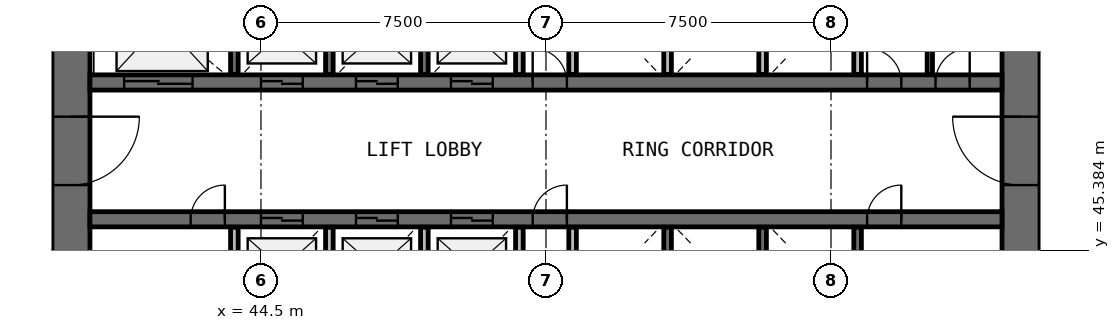
"""IFC4 building model, lengths in metres.
Left out: names, types, materials, properties, quantities, classifications, styles, units other than length and angle.
Written with IfcOpenShell. Run it as: python <this file> out.ifc"""

import sys

from ifc_helpers import new_model, si_unit, direction, frame, frame_2d, origin, place, context, subcontext, project, spatial, rectangle, extrude, source, transform, mapped, element, fill, save


model = new_model("IFC4")
c1 = context("Model", 3, precision=1e-05, world=origin(), true_north=direction((0.0, 1.0)))
c2 = subcontext(c1, "Body", "Model", "MODEL_VIEW")
j1 = project(units=[si_unit("LENGTHUNIT", "METRE"), si_unit("PLANEANGLEUNIT", "RADIAN")], contexts=[c1])
p1 = place(None, origin())
s1 = spatial("IfcSite", under=j1, at=p1, CompositionType="ELEMENT")
p2 = place(p1, origin())
s2 = spatial("IfcBuilding", under=s1, at=p2, CompositionType="ELEMENT")
p3 = place(p2, frame((0.0, 0.0, 9.4)))
s3 = spatial("IfcBuildingStorey", under=s2, at=p3, CompositionType="ELEMENT", Elevation=9.4)
p4 = place(p3, frame((64.5, 38.0, 0.0), z_axis=(0.0, 0.0, 1.0), x_axis=(0.0, 1.0, 0.0)))
e1 = element("IfcWall", 1, at=p4, inside=s3, PredefinedType="SHEAR", context=c2, shape_type="SweptSolid", body=[
    extrude(rectangle(XDim=20.0, YDim=1.0, at=frame_2d((10.0, 0.0))), origin(), (0.0, 0.0, 1.0), 4.4),
])
p5 = place(p4, frame((9.1, 0.0, 0.0)))
e2 = element("IfcOpeningElement", 2, at=p5, cuts=e1, PredefinedType="OPENING", context=c2, shape_type="SweptSolid", body=[
    extrude(rectangle(XDim=1.8, YDim=2.1, at=frame_2d((0.9, 1.05))), frame((0.0, 0.51, 0.0), z_axis=(0.0, -1.0, 0.0), x_axis=(1.0, 0.0, 0.0)), (0.0, 0.0, 1.0), 1.02),
])
p6 = place(p3, frame((39.5, 58.0, 0.0), z_axis=(0.0, 0.0, 1.0), x_axis=(0.0, -1.0, 0.0)))
e3 = element("IfcWall", 3, at=p6, inside=s3, PredefinedType="SHEAR", context=c2, shape_type="SweptSolid", body=[
    extrude(rectangle(XDim=20.0, YDim=1.0, at=frame_2d((10.0, 0.0))), origin(), (0.0, 0.0, 1.0), 4.4),
])
p7 = place(p6, frame((9.1, 0.0, 0.0)))
e4 = element("IfcOpeningElement", 4, at=p7, cuts=e3, PredefinedType="OPENING", context=c2, shape_type="SweptSolid", body=[
    extrude(rectangle(XDim=1.8, YDim=2.1, at=frame_2d((0.9, 1.05))), frame((0.0, 0.51, 0.0), z_axis=(0.0, -1.0, 0.0), x_axis=(1.0, 0.0, 0.0)), (0.0, 0.0, 1.0), 1.02),
])
p8 = place(p3, frame((40.0, 49.8, 0.0), z_axis=(0.0, 0.0, 1.0), x_axis=(1.0, 0.0, 0.0)))
e5 = element("IfcWall", 5, at=p8, inside=s3, PredefinedType="SHEAR", context=c2, shape_type="SweptSolid", body=[
    extrude(rectangle(XDim=24.0, YDim=0.4, at=frame_2d((12.0, 0.0))), origin(), (0.0, 0.0, 1.0), 4.4),
])
p9 = place(p8, frame((4.5, 0.0, 0.0)))
e6 = element("IfcOpeningElement", 6, at=p9, cuts=e5, PredefinedType="OPENING", context=c2, shape_type="SweptSolid", body=[
    extrude(rectangle(XDim=1.1, YDim=2.1, at=frame_2d((0.55, 1.05))), frame((0.0, 0.21, 0.0), z_axis=(0.0, -1.0, 0.0), x_axis=(1.0, 0.0, 0.0)), (0.0, 0.0, 1.0), 0.42),
])
p10 = place(p8, frame((7.0, 0.0, 0.0)))
e7 = element("IfcOpeningElement", 7, at=p10, cuts=e5, PredefinedType="OPENING", context=c2, shape_type="SweptSolid", body=[
    extrude(rectangle(XDim=1.1, YDim=2.1, at=frame_2d((0.55, 1.05))), frame((0.0, 0.21, 0.0), z_axis=(0.0, -1.0, 0.0), x_axis=(1.0, 0.0, 0.0)), (0.0, 0.0, 1.0), 0.42),
])
p11 = place(p8, frame((9.5, 0.0, 0.0)))
e8 = element("IfcOpeningElement", 8, at=p11, cuts=e5, PredefinedType="OPENING", context=c2, shape_type="SweptSolid", body=[
    extrude(rectangle(XDim=1.1, YDim=2.1, at=frame_2d((0.55, 1.05))), frame((0.0, 0.21, 0.0), z_axis=(0.0, -1.0, 0.0), x_axis=(1.0, 0.0, 0.0)), (0.0, 0.0, 1.0), 0.42),
])
p12 = place(p8, frame((0.9, 0.0, 0.0)))
e9 = element("IfcOpeningElement", 9, at=p12, cuts=e5, PredefinedType="OPENING", context=c2, shape_type="SweptSolid", body=[
    extrude(rectangle(XDim=1.8, YDim=2.4, at=frame_2d((0.9, 1.2))), frame((0.0, 0.21, 0.0), z_axis=(0.0, -1.0, 0.0), x_axis=(1.0, 0.0, 0.0)), (0.0, 0.0, 1.0), 0.42),
])
p13 = place(p8, frame((20.45, 0.0, 0.0)))
e10 = element("IfcOpeningElement", 10, at=p13, cuts=e5, PredefinedType="OPENING", context=c2, shape_type="SweptSolid", body=[
    extrude(rectangle(XDim=0.9, YDim=2.1, at=frame_2d((0.45, 1.05))), frame((0.0, 0.21, 0.0), z_axis=(0.0, -1.0, 0.0), x_axis=(1.0, 0.0, 0.0)), (0.0, 0.0, 1.0), 0.42),
])
p14 = place(p8, frame((22.25, 0.0, 0.0)))
e11 = element("IfcOpeningElement", 11, at=p14, cuts=e5, PredefinedType="OPENING", context=c2, shape_type="SweptSolid", body=[
    extrude(rectangle(XDim=0.9, YDim=2.1, at=frame_2d((0.45, 1.05))), frame((0.0, 0.21, 0.0), z_axis=(0.0, -1.0, 0.0), x_axis=(1.0, 0.0, 0.0)), (0.0, 0.0, 1.0), 0.42),
])
p15 = place(p8, frame((11.65, 0.0, 0.0)))
e12 = element("IfcOpeningElement", 12, at=p15, cuts=e5, PredefinedType="OPENING", context=c2, shape_type="SweptSolid", body=[
    extrude(rectangle(XDim=0.9, YDim=2.1, at=frame_2d((0.45, 1.05))), frame((0.0, 0.21, 0.0), z_axis=(0.0, -1.0, 0.0), x_axis=(1.0, 0.0, 0.0)), (0.0, 0.0, 1.0), 0.42),
])
p16 = place(p3, frame((40.0, 46.2, 0.0), z_axis=(0.0, 0.0, 1.0), x_axis=(1.0, 0.0, 0.0)))
e13 = element("IfcWall", 13, at=p16, inside=s3, PredefinedType="SHEAR", context=c2, shape_type="SweptSolid", body=[
    extrude(rectangle(XDim=24.0, YDim=0.4, at=frame_2d((12.0, 0.0))), origin(), (0.0, 0.0, 1.0), 4.4),
])
p17 = place(p16, frame((4.5, 0.0, 0.0)))
e14 = element("IfcOpeningElement", 14, at=p17, cuts=e13, PredefinedType="OPENING", context=c2, shape_type="SweptSolid", body=[
    extrude(rectangle(XDim=1.1, YDim=2.1, at=frame_2d((0.55, 1.05))), frame((0.0, 0.21, 0.0), z_axis=(0.0, -1.0, 0.0), x_axis=(1.0, 0.0, 0.0)), (0.0, 0.0, 1.0), 0.42),
])
p18 = place(p16, frame((7.0, 0.0, 0.0)))
e15 = element("IfcOpeningElement", 15, at=p18, cuts=e13, PredefinedType="OPENING", context=c2, shape_type="SweptSolid", body=[
    extrude(rectangle(XDim=1.1, YDim=2.1, at=frame_2d((0.55, 1.05))), frame((0.0, 0.21, 0.0), z_axis=(0.0, -1.0, 0.0), x_axis=(1.0, 0.0, 0.0)), (0.0, 0.0, 1.0), 0.42),
])
p19 = place(p16, frame((9.5, 0.0, 0.0)))
e16 = element("IfcOpeningElement", 16, at=p19, cuts=e13, PredefinedType="OPENING", context=c2, shape_type="SweptSolid", body=[
    extrude(rectangle(XDim=1.1, YDim=2.1, at=frame_2d((0.55, 1.05))), frame((0.0, 0.21, 0.0), z_axis=(0.0, -1.0, 0.0), x_axis=(1.0, 0.0, 0.0)), (0.0, 0.0, 1.0), 0.42),
])
p20 = place(p16, frame((20.45, 0.0, 0.0)))
e17 = element("IfcOpeningElement", 17, at=p20, cuts=e13, PredefinedType="OPENING", context=c2, shape_type="SweptSolid", body=[
    extrude(rectangle(XDim=0.9, YDim=2.1, at=frame_2d((0.45, 1.05))), frame((0.0, 0.21, 0.0), z_axis=(0.0, -1.0, 0.0), x_axis=(1.0, 0.0, 0.0)), (0.0, 0.0, 1.0), 0.42),
])
p21 = place(p16, frame((2.65, 0.0, 0.0)))
e18 = element("IfcOpeningElement", 18, at=p21, cuts=e13, PredefinedType="OPENING", context=c2, shape_type="SweptSolid", body=[
    extrude(rectangle(XDim=0.9, YDim=2.1, at=frame_2d((0.45, 1.05))), frame((0.0, 0.21, 0.0), z_axis=(0.0, -1.0, 0.0), x_axis=(1.0, 0.0, 0.0)), (0.0, 0.0, 1.0), 0.42),
])
p22 = place(p16, frame((11.65, 0.0, 0.0)))
e19 = element("IfcOpeningElement", 19, at=p22, cuts=e13, PredefinedType="OPENING", context=c2, shape_type="SweptSolid", body=[
    extrude(rectangle(XDim=0.9, YDim=2.1, at=frame_2d((0.45, 1.05))), frame((0.0, 0.21, 0.0), z_axis=(0.0, -1.0, 0.0), x_axis=(1.0, 0.0, 0.0)), (0.0, 0.0, 1.0), 0.42),
])
for number, where, z_axis, x_axis in (
    (20, (43.8, 45.99, 0.0), (0.0, 0.0, 1.0), (0.0, -1.0, 0.0)),
    (21, (43.8, 52.37, 0.0), (0.0, 0.0, 1.0), (0.0, -1.0, 0.0)),
):
    element("IfcWall", number, at=place(p3, frame(where, z_axis=z_axis, x_axis=x_axis)), inside=s3, PredefinedType="SOLIDWALL", context=c2, shape_type="SweptSolid", body=[
        extrude(rectangle(XDim=2.36, YDim=0.2, at=frame_2d((1.18, 0.0))), origin(), (0.0, 0.0, 1.0), 3.95),
    ])
p23 = place(p3, frame((46.3, 43.6, 0.0), z_axis=(0.0, 0.0, 1.0), x_axis=(0.0, 1.0, 0.0)))
e22 = element("IfcWall", 22, at=p23, inside=s3, PredefinedType="SOLIDWALL", context=c2, shape_type="SweptSolid", body=[
    extrude(rectangle(XDim=2.39, YDim=0.2, at=frame_2d((1.195, 0.0))), origin(), (0.0, 0.0, 1.0), 3.95),
])
for number, where, z_axis, x_axis in (
    (23, (46.3, 50.01, 0.0), (0.0, 0.0, 1.0), (0.0, 1.0, 0.0)),
    (24, (48.8, 43.63, 0.0), (0.0, 0.0, 1.0), (0.0, 1.0, 0.0)),
    (25, (48.8, 50.01, 0.0), (0.0, 0.0, 1.0), (0.0, 1.0, 0.0)),
    (26, (51.3, 43.63, 0.0), (0.0, 0.0, 1.0), (0.0, 1.0, 0.0)),
):
    element("IfcWall", number, at=place(p3, frame(where, z_axis=z_axis, x_axis=x_axis)), inside=s3, PredefinedType="SOLIDWALL", context=c2, shape_type="SweptSolid", body=[
        extrude(rectangle(XDim=2.36, YDim=0.2, at=frame_2d((1.18, 0.0))), origin(), (0.0, 0.0, 1.0), 3.95),
    ])
for number, where, z_axis, x_axis in (
    (27, (51.3, 50.01, 0.0), (0.0, 0.0, 1.0), (0.0, 1.0, 0.0)),
    (28, (52.7, 45.99, 0.0), (0.0, 0.0, 1.0), (0.0, -1.0, 0.0)),
):
    element("IfcWall", number, at=place(p3, frame(where, z_axis=z_axis, x_axis=x_axis)), inside=s3, PredefinedType="SOLIDWALL", context=c2, shape_type="SweptSolid", body=[
        extrude(rectangle(XDim=2.39, YDim=0.2, at=frame_2d((1.195, 0.0))), origin(), (0.0, 0.0, 1.0), 3.95),
    ])
for number, where, z_axis, x_axis in (
    (29, (52.7, 52.37, 0.0), (0.0, 0.0, 1.0), (0.0, -1.0, 0.0)),
    (30, (55.2, 43.63, 0.0), (0.0, 0.0, 1.0), (0.0, 1.0, 0.0)),
    (31, (55.2, 50.01, 0.0), (0.0, 0.0, 1.0), (0.0, 1.0, 0.0)),
    (32, (57.7, 43.63, 0.0), (0.0, 0.0, 1.0), (0.0, 1.0, 0.0)),
):
    element("IfcWall", number, at=place(p3, frame(where, z_axis=z_axis, x_axis=x_axis)), inside=s3, PredefinedType="SOLIDWALL", context=c2, shape_type="SweptSolid", body=[
        extrude(rectangle(XDim=2.36, YDim=0.2, at=frame_2d((1.18, 0.0))), origin(), (0.0, 0.0, 1.0), 3.95),
    ])
p24 = place(p3, frame((57.7, 50.01, 0.0), z_axis=(0.0, 0.0, 1.0), x_axis=(0.0, 1.0, 0.0)))
e33 = element("IfcWall", 33, at=p24, inside=s3, PredefinedType="SOLIDWALL", context=c2, shape_type="SweptSolid", body=[
    extrude(rectangle(XDim=2.39, YDim=0.2, at=frame_2d((1.195, 0.0))), origin(), (0.0, 0.0, 1.0), 3.95),
])
for number, where, z_axis, x_axis in (
    (34, (60.2, 43.63, 0.0), (0.0, 0.0, 1.0), (0.0, 1.0, 0.0)),
    (35, (60.2, 50.01, 0.0), (0.0, 0.0, 1.0), (0.0, 1.0, 0.0)),
):
    element("IfcWall", number, at=place(p3, frame(where, z_axis=z_axis, x_axis=x_axis)), inside=s3, PredefinedType="SOLIDWALL", context=c2, shape_type="SweptSolid", body=[
        extrude(rectangle(XDim=2.36, YDim=0.2, at=frame_2d((1.18, 0.0))), origin(), (0.0, 0.0, 1.0), 3.95),
    ])
p25 = place(p3, frame((62.1, 50.01, 0.0), z_axis=(0.0, 0.0, 1.0), x_axis=(0.0, 1.0, 0.0)))
e36 = element("IfcWall", 36, at=p25, inside=s3, PredefinedType="PARTITIONING", context=c2, shape_type="SweptSolid", body=[
    extrude(rectangle(XDim=2.39, YDim=0.14, at=frame_2d((1.195, 0.0))), origin(), (0.0, 0.0, 1.0), 3.15),
])
m1 = source(origin(), c2, "Body", "SweptSolid", [
    extrude(rectangle(XDim=1.8, YDim=2.1, at=frame_2d((0.9, 1.05))), frame((0.0, 0.025, 0.0), z_axis=(0.0, -1.0, 0.0), x_axis=(1.0, 0.0, 0.0)), (0.0, 0.0, 1.0), 0.05),
])
p26 = place(p7, origin())
e37 = element("IfcDoor", 37, at=p26, inside=s3, OperationType="SINGLE_SWING_LEFT", PredefinedType="DOOR", context=c2, shape_type="MappedRepresentation", body=[
    mapped(m1, transform((0.0, 0.0, 0.0), scale=1.0)),
])
fill(e4, e37)
p27 = place(p5, origin())
e38 = element("IfcDoor", 38, at=p27, inside=s3, OperationType="SINGLE_SWING_RIGHT", PredefinedType="DOOR", context=c2, shape_type="MappedRepresentation", body=[
    mapped(m1, transform((0.0, 0.0, 0.0), scale=1.0)),
])
fill(e2, e38)
m2 = source(origin(), c2, "Body", "SweptSolid", [
    extrude(rectangle(XDim=1.1, YDim=2.1, at=frame_2d((0.55, 1.05))), frame((0.0, 0.025, 0.0), z_axis=(0.0, -1.0, 0.0), x_axis=(1.0, 0.0, 0.0)), (0.0, 0.0, 1.0), 0.05),
])
p28 = place(p9, origin())
e39 = element("IfcDoor", 39, at=p28, inside=s3, OperationType="DOUBLE_DOOR_SLIDING", PredefinedType="USERDEFINED", context=c2, shape_type="MappedRepresentation", body=[
    mapped(m2, transform((0.0, 0.0, 0.0), scale=1.0)),
])
fill(e6, e39)
p29 = place(p10, origin())
e40 = element("IfcDoor", 40, at=p29, inside=s3, OperationType="DOUBLE_DOOR_SLIDING", PredefinedType="USERDEFINED", context=c2, shape_type="MappedRepresentation", body=[
    mapped(m2, transform((0.0, 0.0, 0.0), scale=1.0)),
])
fill(e7, e40)
p30 = place(p11, origin())
e41 = element("IfcDoor", 41, at=p30, inside=s3, OperationType="DOUBLE_DOOR_SLIDING", PredefinedType="USERDEFINED", context=c2, shape_type="MappedRepresentation", body=[
    mapped(m2, transform((0.0, 0.0, 0.0), scale=1.0)),
])
fill(e8, e41)
p31 = place(p17, origin())
e42 = element("IfcDoor", 42, at=p31, inside=s3, OperationType="DOUBLE_DOOR_SLIDING", PredefinedType="USERDEFINED", context=c2, shape_type="MappedRepresentation", body=[
    mapped(m2, transform((0.0, 0.0, 0.0), scale=1.0)),
])
fill(e14, e42)
p32 = place(p18, origin())
e43 = element("IfcDoor", 43, at=p32, inside=s3, OperationType="DOUBLE_DOOR_SLIDING", PredefinedType="USERDEFINED", context=c2, shape_type="MappedRepresentation", body=[
    mapped(m2, transform((0.0, 0.0, 0.0), scale=1.0)),
])
fill(e15, e43)
p33 = place(p19, origin())
e44 = element("IfcDoor", 44, at=p33, inside=s3, OperationType="DOUBLE_DOOR_SLIDING", PredefinedType="USERDEFINED", context=c2, shape_type="MappedRepresentation", body=[
    mapped(m2, transform((0.0, 0.0, 0.0), scale=1.0)),
])
fill(e16, e44)
m3 = source(origin(), c2, "Body", "SweptSolid", [
    extrude(rectangle(XDim=1.8, YDim=2.4, at=frame_2d((0.9, 1.2))), frame((0.0, 0.025, 0.0), z_axis=(0.0, -1.0, 0.0), x_axis=(1.0, 0.0, 0.0)), (0.0, 0.0, 1.0), 0.05),
])
p34 = place(p12, origin())
e45 = element("IfcDoor", 45, at=p34, inside=s3, OperationType="DOUBLE_DOOR_SLIDING", PredefinedType="USERDEFINED", context=c2, shape_type="MappedRepresentation", body=[
    mapped(m3, transform((0.0, 0.0, 0.0), scale=1.0)),
])
fill(e9, e45)
m4 = source(origin(), c2, "Body", "SweptSolid", [
    extrude(rectangle(XDim=0.9, YDim=2.1, at=frame_2d((0.45, 1.05))), frame((0.0, 0.025, 0.0), z_axis=(0.0, -1.0, 0.0), x_axis=(1.0, 0.0, 0.0)), (0.0, 0.0, 1.0), 0.05),
])
p35 = place(p20, origin())
e46 = element("IfcDoor", 46, at=p35, inside=s3, OperationType="SINGLE_SWING_RIGHT", PredefinedType="DOOR", context=c2, shape_type="MappedRepresentation", body=[
    mapped(m4, transform((0.0, 0.0, 0.0), scale=1.0)),
])
fill(e17, e46)
p36 = place(p13, origin())
e47 = element("IfcDoor", 47, at=p36, inside=s3, OperationType="SINGLE_SWING_LEFT", PredefinedType="DOOR", context=c2, shape_type="MappedRepresentation", body=[
    mapped(m4, transform((0.0, 0.0, 0.0), scale=1.0)),
])
fill(e10, e47)
p37 = place(p14, origin())
e48 = element("IfcDoor", 48, at=p37, inside=s3, OperationType="SINGLE_SWING_RIGHT", PredefinedType="DOOR", context=c2, shape_type="MappedRepresentation", body=[
    mapped(m4, transform((0.0, 0.0, 0.0), scale=1.0)),
])
fill(e11, e48)
p38 = place(p21, origin())
e49 = element("IfcDoor", 49, at=p38, inside=s3, OperationType="SINGLE_SWING_RIGHT", PredefinedType="DOOR", context=c2, shape_type="MappedRepresentation", body=[
    mapped(m4, transform((0.0, 0.0, 0.0), scale=1.0)),
])
fill(e18, e49)
p39 = place(p15, origin())
e50 = element("IfcDoor", 50, at=p39, inside=s3, OperationType="SINGLE_SWING_LEFT", PredefinedType="DOOR", context=c2, shape_type="MappedRepresentation", body=[
    mapped(m4, transform((0.0, 0.0, 0.0), scale=1.0)),
])
fill(e12, e50)
p40 = place(p22, origin())
e51 = element("IfcDoor", 51, at=p40, inside=s3, OperationType="SINGLE_SWING_RIGHT", PredefinedType="DOOR", context=c2, shape_type="MappedRepresentation", body=[
    mapped(m4, transform((0.0, 0.0, 0.0), scale=1.0)),
])
fill(e19, e51)
save(model, sys.argv[1])
